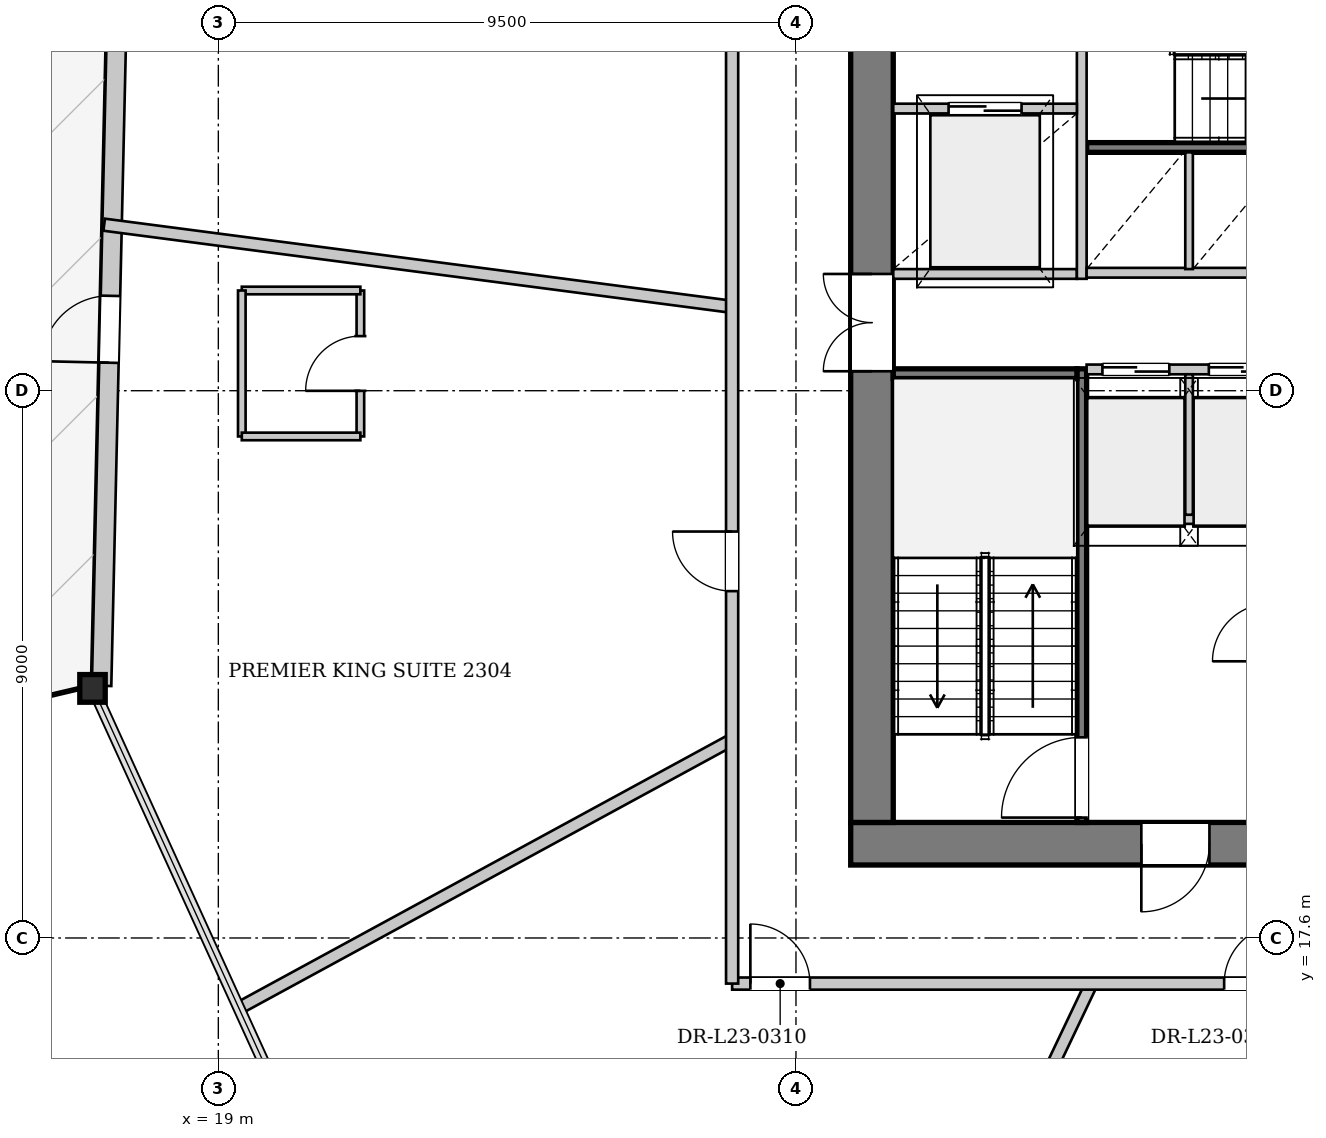
"""IFC4 building model, lengths in metres.
Left out: names, types, materials, properties, quantities, classifications, styles, units other than length and angle.
Written with IfcOpenShell. Run it as: python <this file> out.ifc"""

import sys

from ifc_helpers import new_model, si_unit, direction, frame, frame_2d, origin, origin_2d, place, context, subcontext, project, spatial, rectangle, i_section, extrude, source, transform, mapped, element, fill, save


model = new_model("IFC4")
c1 = context("Model", 3, precision=1e-05, world=origin(), true_north=direction((0.0, 1.0)))
c2 = subcontext(c1, "Body", "Model", "MODEL_VIEW")
j1 = project(units=[si_unit("LENGTHUNIT", "METRE"), si_unit("PLANEANGLEUNIT", "RADIAN")], contexts=[c1])
p1 = place(None, origin())
s1 = spatial("IfcSite", under=j1, at=p1, CompositionType="ELEMENT")
p2 = place(p1, origin())
s2 = spatial("IfcBuilding", under=s1, at=p2, CompositionType="ELEMENT")
p3 = place(p2, frame((0.0, 0.0, 91.5)))
s3 = spatial("IfcBuildingStorey", under=s2, at=p3, CompositionType="ELEMENT", Elevation=91.5)
m1 = source(origin(), c2, "Body", "SweptSolid", [
    extrude(i_section(OverallWidth=0.418, OverallDepth=0.455, WebThickness=0.038, FlangeThickness=0.059, at=origin_2d()), origin(), (0.0, 0.0, 1.0), 3.386),
])
p4 = place(p3, frame((16.92, 21.75, 0.0), z_axis=(0.00627236322, -0.027108144489, 0.99961282803), x_axis=(0.974260018771, 0.225427185194, 0.0)))
e1 = element("IfcColumn", 1, at=p4, inside=s3, PredefinedType="COLUMN", context=c2, shape_type="MappedRepresentation", body=[
    mapped(m1, transform((0.0, 0.0, 0.0), x_axis=(1.0, 0.0, 0.0), y_axis=(0.0, 1.0, 0.0), z_axis=(0.0, 0.0, 1.0), scale=1.0)),
])
p5 = place(p3, frame((17.08, 21.747, 0.0), z_axis=(0.0, 0.0, 1.0), x_axis=(0.022779504823, 0.999740513413, 0.0)))
e2 = element("IfcWall", 2, at=p5, inside=s3, PredefinedType="SOLIDWALL", context=c2, shape_type="SweptSolid", body=[
    extrude(rectangle(XDim=18.327, YDim=0.32, at=frame_2d((9.164, 0.0))), origin(), (0.0, 0.0, 1.0), 2.692),
])
p6 = place(p5, frame((5.315, 0.0, 0.0)))
e3 = element("IfcOpeningElement", 3, at=p6, cuts=e2, PredefinedType="OPENING", context=c2, shape_type="SweptSolid", body=[
    extrude(rectangle(XDim=1.1, YDim=2.3, at=frame_2d((0.55, 1.15))), frame((0.0, 0.17, 0.0), z_axis=(0.0, -1.0, 0.0), x_axis=(1.0, 0.0, 0.0)), (0.0, 0.0, 1.0), 0.34),
])
p7 = place(p5, frame((12.662, 0.0, 0.372)))
e4 = element("IfcOpeningElement", 4, at=p7, cuts=e2, PredefinedType="OPENING", context=c2, shape_type="SweptSolid", body=[
    extrude(rectangle(XDim=1.8, YDim=2.2, at=frame_2d((0.9, 1.1))), frame((0.0, 0.17, 0.0), z_axis=(0.0, -1.0, 0.0), x_axis=(1.0, 0.0, 0.0)), (0.0, 0.0, 1.0), 0.34),
])
p8 = place(p3, frame((46.6, 19.15, 0.0), z_axis=(0.0, 0.0, 1.0), x_axis=(-1.0, 0.0, 0.0)))
e5 = element("IfcWall", 5, at=p8, inside=s3, PredefinedType="SHEAR", context=c2, shape_type="SweptSolid", body=[
    extrude(rectangle(XDim=17.2, YDim=0.7, at=frame_2d((8.6, 0.0))), origin(), (0.0, 0.0, 1.0), 3.3),
])
p9 = place(p8, frame((4.8, 0.0, 0.0)))
e6 = element("IfcOpeningElement", 6, at=p9, cuts=e5, PredefinedType="OPENING", context=c2, shape_type="SweptSolid", body=[
    extrude(rectangle(XDim=1.12, YDim=2.25, at=frame_2d((0.56, 1.125))), frame((0.0, 0.36, 0.0), z_axis=(0.0, -1.0, 0.0), x_axis=(1.0, 0.0, 0.0)), (0.0, 0.0, 1.0), 0.72),
])
p10 = place(p8, frame((11.3, 0.0, 0.0)))
e7 = element("IfcOpeningElement", 7, at=p10, cuts=e5, PredefinedType="OPENING", context=c2, shape_type="SweptSolid", body=[
    extrude(rectangle(XDim=1.12, YDim=2.25, at=frame_2d((0.56, 1.125))), frame((0.0, 0.36, 0.0), z_axis=(0.0, -1.0, 0.0), x_axis=(1.0, 0.0, 0.0)), (0.0, 0.0, 1.0), 0.72),
])
p11 = place(p3, frame((29.75, 19.5, 0.0), z_axis=(0.0, 0.0, 1.0), x_axis=(0.0, 1.0, 0.0)))
e8 = element("IfcWall", 8, at=p11, inside=s3, PredefinedType="SHEAR", context=c2, shape_type="SweptSolid", body=[
    extrude(rectangle(XDim=14.2, YDim=0.7, at=frame_2d((7.1, 0.0))), origin(), (0.0, 0.0, 1.0), 3.3),
])
p12 = place(p11, frame((7.42, 0.0, 0.0)))
e9 = element("IfcOpeningElement", 9, at=p12, cuts=e8, PredefinedType="OPENING", context=c2, shape_type="SweptSolid", body=[
    extrude(rectangle(XDim=1.6, YDim=2.2, at=frame_2d((0.8, 1.1))), frame((0.0, 0.36, 0.0), z_axis=(0.0, -1.0, 0.0), x_axis=(1.0, 0.0, 0.0)), (0.0, 0.0, 1.0), 0.72),
])
p13 = place(p3, frame((33.2, 19.5, 0.0), z_axis=(0.0, 0.0, 1.0), x_axis=(0.0, 1.0, 0.0)))
e10 = element("IfcWall", 10, at=p13, inside=s3, PredefinedType="PARTITIONING", context=c2, shape_type="SweptSolid", body=[
    extrude(rectangle(XDim=7.46, YDim=0.16, at=frame_2d((3.73, 0.0))), origin(), (0.0, 0.0, 1.0), 3.3),
])
p14 = place(p13, frame((0.08, 0.0, 0.0)))
e11 = element("IfcOpeningElement", 11, at=p14, cuts=e10, PredefinedType="OPENING", context=c2, shape_type="SweptSolid", body=[
    extrude(rectangle(XDim=1.32, YDim=2.2, at=frame_2d((0.66, 1.1))), frame((0.0, 0.09, 0.0), z_axis=(0.0, -1.0, 0.0), x_axis=(1.0, 0.0, 0.0)), (0.0, 0.0, 1.0), 0.18),
])
p15 = place(p3, frame((30.1, 26.88, 0.0), z_axis=(0.0, 0.0, 1.0), x_axis=(1.0, 0.0, 0.0)))
e12 = element("IfcWall", 12, at=p15, inside=s3, PredefinedType="PARTITIONING", context=c2, shape_type="SweptSolid", body=[
    extrude(rectangle(XDim=3.02, YDim=0.16, at=frame_2d((1.51, 0.0))), origin(), (0.0, 0.0, 1.0), 3.3),
])
p16 = place(p3, frame((33.28, 30.6, 0.0), z_axis=(0.0, 0.0, 1.0), x_axis=(1.0, 0.0, 0.0)))
e13 = element("IfcWall", 13, at=p16, inside=s3, PredefinedType="PARTITIONING", context=c2, shape_type="SweptSolid", body=[
    extrude(rectangle(XDim=7.3, YDim=0.16, at=frame_2d((3.65, 0.0))), origin(), (0.0, 0.0, 1.0), 3.3),
])
p17 = place(p3, frame((33.28, 24.49, 0.0), z_axis=(0.0, 0.0, 1.0), x_axis=(1.0, 0.0, 0.0)))
e14 = element("IfcWall", 14, at=p17, inside=s3, PredefinedType="PARTITIONING", context=c2, shape_type="SweptSolid", body=[
    extrude(rectangle(XDim=9.44, YDim=0.16, at=frame_2d((4.72, 0.0))), origin(), (0.0, 0.0, 1.0), 3.3),
])
p18 = place(p3, frame((30.1, 28.52, 0.0), z_axis=(0.0, 0.0, 1.0), x_axis=(1.0, 0.0, 0.0)))
e15 = element("IfcWall", 15, at=p18, inside=s3, PredefinedType="PARTITIONING", context=c2, shape_type="SweptSolid", body=[
    extrude(rectangle(XDim=3.02, YDim=0.16, at=frame_2d((1.51, 0.0))), origin(), (0.0, 0.0, 1.0), 3.3),
])
p19 = place(p3, frame((33.2, 28.44, 0.0), z_axis=(0.0, 0.0, 1.0), x_axis=(0.0, 1.0, 0.0)))
e16 = element("IfcWall", 16, at=p19, inside=s3, PredefinedType="PARTITIONING", context=c2, shape_type="SweptSolid", body=[
    extrude(rectangle(XDim=5.26, YDim=0.16, at=frame_2d((2.63, 0.0))), origin(), (0.0, 0.0, 1.0), 3.3),
])
p20 = place(p3, frame((30.1, 31.24, 0.0), z_axis=(0.0, 0.0, 1.0), x_axis=(1.0, 0.0, 0.0)))
e17 = element("IfcWall", 17, at=p20, inside=s3, PredefinedType="PARTITIONING", context=c2, shape_type="SweptSolid", body=[
    extrude(rectangle(XDim=3.02, YDim=0.16, at=frame_2d((1.51, 0.0))), origin(), (0.0, 0.0, 1.0), 3.3),
])
p21 = place(p20, frame((0.91, 0.0, 0.0)))
e18 = element("IfcOpeningElement", 18, at=p21, cuts=e17, PredefinedType="OPENING", context=c2, shape_type="SweptSolid", body=[
    extrude(rectangle(XDim=1.2, YDim=2.2, at=frame_2d((0.6, 1.1))), frame((0.0, 0.09, 0.0), z_axis=(0.0, -1.0, 0.0), x_axis=(1.0, 0.0, 0.0)), (0.0, 0.0, 1.0), 0.18),
])
p22 = place(p3, frame((33.28, 26.95, 0.0), z_axis=(0.0, 0.0, 1.0), x_axis=(1.0, 0.0, 0.0)))
e19 = element("IfcWall", 19, at=p22, inside=s3, PredefinedType="PARTITIONING", context=c2, shape_type="SweptSolid", body=[
    extrude(rectangle(XDim=9.44, YDim=0.16, at=frame_2d((4.72, 0.0))), origin(), (0.0, 0.0, 1.0), 3.3),
])
p23 = place(p22, frame((0.26, 0.0, 0.0)))
e20 = element("IfcOpeningElement", 20, at=p23, cuts=e19, PredefinedType="OPENING", context=c2, shape_type="SweptSolid", body=[
    extrude(rectangle(XDim=1.1, YDim=2.2, at=frame_2d((0.55, 1.1))), frame((0.0, 0.09, 0.0), z_axis=(0.0, -1.0, 0.0), x_axis=(1.0, 0.0, 0.0)), (0.0, 0.0, 1.0), 0.18),
])
p24 = place(p22, frame((2.01, 0.0, 0.0)))
e21 = element("IfcOpeningElement", 21, at=p24, cuts=e19, PredefinedType="OPENING", context=c2, shape_type="SweptSolid", body=[
    extrude(rectangle(XDim=1.1, YDim=2.2, at=frame_2d((0.55, 1.1))), frame((0.0, 0.09, 0.0), z_axis=(0.0, -1.0, 0.0), x_axis=(1.0, 0.0, 0.0)), (0.0, 0.0, 1.0), 0.18),
])
p25 = place(p22, frame((3.76, 0.0, 0.0)))
e22 = element("IfcOpeningElement", 22, at=p25, cuts=e19, PredefinedType="OPENING", context=c2, shape_type="SweptSolid", body=[
    extrude(rectangle(XDim=1.1, YDim=2.2, at=frame_2d((0.55, 1.1))), frame((0.0, 0.09, 0.0), z_axis=(0.0, -1.0, 0.0), x_axis=(1.0, 0.0, 0.0)), (0.0, 0.0, 1.0), 0.18),
])
p26 = place(p22, frame((5.51, 0.0, 0.0)))
e23 = element("IfcOpeningElement", 23, at=p26, cuts=e19, PredefinedType="OPENING", context=c2, shape_type="SweptSolid", body=[
    extrude(rectangle(XDim=1.1, YDim=2.2, at=frame_2d((0.55, 1.1))), frame((0.0, 0.09, 0.0), z_axis=(0.0, -1.0, 0.0), x_axis=(1.0, 0.0, 0.0)), (0.0, 0.0, 1.0), 0.18),
])
p27 = place(p3, frame((34.965, 24.56, 0.0), z_axis=(0.0, 0.0, 1.0), x_axis=(0.0, 1.0, 0.0)))
e24 = element("IfcWall", 24, at=p27, inside=s3, PredefinedType="PARTITIONING", context=c2, shape_type="SweptSolid", body=[
    extrude(rectangle(XDim=2.31, YDim=0.125, at=frame_2d((1.155, 0.0))), origin(), (0.0, 0.0, 1.0), 3.3),
])
p28 = place(p3, frame((33.28, 28.54, 0.0), z_axis=(0.0, 0.0, 1.0), x_axis=(1.0, 0.0, 0.0)))
e25 = element("IfcWall", 25, at=p28, inside=s3, PredefinedType="PARTITIONING", context=c2, shape_type="SweptSolid", body=[
    extrude(rectangle(XDim=12.62, YDim=0.16, at=frame_2d((6.31, 0.0))), origin(), (0.0, 0.0, 1.0), 3.3),
])
p29 = place(p3, frame((34.965, 28.6, 0.0), z_axis=(0.0, 0.0, 1.0), x_axis=(0.0, 1.0, 0.0)))
e26 = element("IfcWall", 26, at=p29, inside=s3, PredefinedType="PARTITIONING", context=c2, shape_type="SweptSolid", body=[
    extrude(rectangle(XDim=1.92, YDim=0.125, at=frame_2d((0.96, 0.0))), origin(), (0.0, 0.0, 1.0), 3.3),
])
p30 = place(p3, frame((27.45, 27.979, 0.0), z_axis=(0.0, 0.0, 1.0), x_axis=(-0.991556828893, 0.129672877176, 0.0)))
e27 = element("IfcWall", 27, at=p30, inside=s3, PredefinedType="PARTITIONING", context=c2, shape_type="SweptSolid", body=[
    extrude(rectangle(XDim=10.415, YDim=0.2, at=frame_2d((5.208, 0.0))), origin(), (0.0, 0.0, 1.0), 3.3),
])
p31 = place(p3, frame((27.45, 20.86, 0.0), z_axis=(0.0, 0.0, 1.0), x_axis=(-0.878400885475, -0.477924559315, 0.0)))
e28 = element("IfcWall", 28, at=p31, inside=s3, PredefinedType="PARTITIONING", context=c2, shape_type="SweptSolid", body=[
    extrude(rectangle(XDim=9.205, YDim=0.2, at=frame_2d((4.603, 0.0))), origin(), (0.0, 0.0, 1.0), 3.3),
])
p32 = place(p3, frame((33.36, 16.85, 0.0), z_axis=(0.0, 0.0, 1.0), x_axis=(-0.429721491406, -0.902961483024, 0.0)))
e29 = element("IfcWall", 29, at=p32, inside=s3, PredefinedType="PARTITIONING", context=c2, shape_type="SweptSolid", body=[
    extrude(rectangle(XDim=14.165, YDim=0.2, at=frame_2d((7.083, 0.0))), origin(), (0.0, 0.0, 1.0), 3.3),
])
p33 = place(p3, frame((21.336, 25.848, 0.0), z_axis=(0.0, 0.0, 1.0), x_axis=(0.0, 1.0, 0.0)))
e30 = element("IfcWall", 30, at=p33, inside=s3, PredefinedType="PARTITIONING", context=c2, shape_type="SweptSolid", body=[
    extrude(rectangle(XDim=2.4, YDim=0.125, at=frame_2d((1.2, 0.0))), origin(), (0.0, 0.0, 1.0), 3.3),
])
p34 = place(p33, frame((0.75, 0.0, 0.0)))
e31 = element("IfcOpeningElement", 31, at=p34, cuts=e30, PredefinedType="OPENING", context=c2, shape_type="SweptSolid", body=[
    extrude(rectangle(XDim=0.9, YDim=2.1, at=frame_2d((0.45, 1.05))), frame((0.0, 0.073, 0.0), z_axis=(0.0, -1.0, 0.0), x_axis=(1.0, 0.0, 0.0)), (0.0, 0.0, 1.0), 0.145),
])
p35 = place(p3, frame((21.336, 28.248, 0.0), z_axis=(0.0, 0.0, 1.0), x_axis=(-1.0, 0.0, 0.0)))
e32 = element("IfcWall", 32, at=p35, inside=s3, PredefinedType="PARTITIONING", context=c2, shape_type="SweptSolid", body=[
    extrude(rectangle(XDim=1.95, YDim=0.125, at=frame_2d((0.975, 0.0))), origin(), (0.0, 0.0, 1.0), 3.3),
])
p36 = place(p3, frame((19.386, 28.248, 0.0), z_axis=(0.0, 0.0, 1.0), x_axis=(0.0, -1.0, 0.0)))
e33 = element("IfcWall", 33, at=p36, inside=s3, PredefinedType="PARTITIONING", context=c2, shape_type="SweptSolid", body=[
    extrude(rectangle(XDim=2.4, YDim=0.125, at=frame_2d((1.2, 0.0))), origin(), (0.0, 0.0, 1.0), 3.3),
])
p37 = place(p3, frame((19.386, 25.848, 0.0), z_axis=(0.0, 0.0, 1.0), x_axis=(1.0, 0.0, 0.0)))
e34 = element("IfcWall", 34, at=p37, inside=s3, PredefinedType="PARTITIONING", context=c2, shape_type="SweptSolid", body=[
    extrude(rectangle(XDim=1.95, YDim=0.125, at=frame_2d((0.975, 0.0))), origin(), (0.0, 0.0, 1.0), 3.3),
])
p38 = place(p3, frame((27.45, 16.85, 0.0), z_axis=(0.0, 0.0, 1.0), x_axis=(1.0, 0.0, 0.0)))
e35 = element("IfcWall", 35, at=p38, inside=s3, PredefinedType="PARTITIONING", context=c2, shape_type="SweptSolid", body=[
    extrude(rectangle(XDim=21.1, YDim=0.2, at=frame_2d((10.55, 0.0))), origin(), (0.0, 0.0, 1.0), 3.3),
])
p39 = place(p38, frame((0.3, 0.0, 0.0)))
e36 = element("IfcOpeningElement", 36, at=p39, cuts=e35, PredefinedType="OPENING", context=c2, shape_type="SweptSolid", body=[
    extrude(rectangle(XDim=0.98, YDim=2.15, at=frame_2d((0.49, 1.075))), frame((0.0, 0.11, 0.0), z_axis=(0.0, -1.0, 0.0), x_axis=(1.0, 0.0, 0.0)), (0.0, 0.0, 1.0), 0.22),
])
p40 = place(p38, frame((8.092, 0.0, 0.0)))
e37 = element("IfcOpeningElement", 37, at=p40, cuts=e35, PredefinedType="OPENING", context=c2, shape_type="SweptSolid", body=[
    extrude(rectangle(XDim=0.98, YDim=2.15, at=frame_2d((0.49, 1.075))), frame((0.0, 0.11, 0.0), z_axis=(0.0, -1.0, 0.0), x_axis=(1.0, 0.0, 0.0)), (0.0, 0.0, 1.0), 0.22),
])
p41 = place(p38, frame((18.251, 0.0, 0.0)))
e38 = element("IfcOpeningElement", 38, at=p41, cuts=e35, PredefinedType="OPENING", context=c2, shape_type="SweptSolid", body=[
    extrude(rectangle(XDim=0.98, YDim=2.15, at=frame_2d((0.49, 1.075))), frame((0.0, 0.11, 0.0), z_axis=(0.0, -1.0, 0.0), x_axis=(1.0, 0.0, 0.0)), (0.0, 0.0, 1.0), 0.22),
])
p42 = place(p3, frame((27.45, 16.85, 0.0), z_axis=(0.0, 0.0, 1.0), x_axis=(0.0, 1.0, 0.0)))
e39 = element("IfcWall", 39, at=p42, inside=s3, PredefinedType="PARTITIONING", context=c2, shape_type="SweptSolid", body=[
    extrude(rectangle(XDim=19.5, YDim=0.2, at=frame_2d((9.75, 0.0))), origin(), (0.0, 0.0, 1.0), 3.3),
])
p43 = place(p42, frame((15.48, 0.0, 0.0)))
e40 = element("IfcOpeningElement", 40, at=p43, cuts=e39, PredefinedType="OPENING", context=c2, shape_type="SweptSolid", body=[
    extrude(rectangle(XDim=0.98, YDim=2.15, at=frame_2d((0.49, 1.075))), frame((0.0, 0.11, 0.0), z_axis=(0.0, -1.0, 0.0), x_axis=(1.0, 0.0, 0.0)), (0.0, 0.0, 1.0), 0.22),
])
p44 = place(p42, frame((6.454, 0.0, 0.0)))
e41 = element("IfcOpeningElement", 41, at=p44, cuts=e39, PredefinedType="OPENING", context=c2, shape_type="SweptSolid", body=[
    extrude(rectangle(XDim=0.98, YDim=2.15, at=frame_2d((0.49, 1.075))), frame((0.0, 0.11, 0.0), z_axis=(0.0, -1.0, 0.0), x_axis=(1.0, 0.0, 0.0)), (0.0, 0.0, 1.0), 0.22),
])
m2 = source(origin(), c2, "Body", "SweptSolid", [
    extrude(rectangle(XDim=1.1, YDim=2.3, at=frame_2d((0.55, 1.15))), frame((0.0, 0.025, 0.0), z_axis=(0.0, -1.0, 0.0), x_axis=(1.0, 0.0, 0.0)), (0.0, 0.0, 1.0), 0.05),
])
p45 = place(p6, origin())
e42 = element("IfcDoor", 42, at=p45, inside=s3, OperationType="SINGLE_SWING_LEFT", PredefinedType="DOOR", context=c2, shape_type="MappedRepresentation", body=[
    mapped(m2, transform((0.0, 0.0, 0.0), x_axis=(1.0, 0.0, 0.0), y_axis=(0.0, 1.0, 0.0), z_axis=(0.0, 0.0, 1.0), scale=1.0)),
])
fill(e3, e42)
m3 = source(origin(), c2, "Body", "SweptSolid", [
    extrude(rectangle(XDim=1.12, YDim=2.25, at=frame_2d((0.56, 1.125))), frame((0.0, 0.025, 0.0), z_axis=(0.0, -1.0, 0.0), x_axis=(1.0, 0.0, 0.0)), (0.0, 0.0, 1.0), 0.05),
])
p46 = place(p10, origin())
e43 = element("IfcDoor", 43, at=p46, inside=s3, OperationType="SINGLE_SWING_RIGHT", PredefinedType="DOOR", context=c2, shape_type="MappedRepresentation", body=[
    mapped(m3, transform((0.0, 0.0, 0.0), x_axis=(1.0, 0.0, 0.0), y_axis=(0.0, 1.0, 0.0), z_axis=(0.0, 0.0, 1.0), scale=1.0)),
])
fill(e7, e43)
m4 = source(origin(), c2, "Body", "SweptSolid", [
    extrude(rectangle(XDim=1.6, YDim=2.2, at=frame_2d((0.8, 1.1))), frame((0.0, 0.025, 0.0), z_axis=(0.0, -1.0, 0.0), x_axis=(1.0, 0.0, 0.0)), (0.0, 0.0, 1.0), 0.05),
])
p47 = place(p12, origin())
e44 = element("IfcDoor", 44, at=p47, inside=s3, OperationType="DOUBLE_DOOR_SINGLE_SWING", PredefinedType="DOOR", context=c2, shape_type="MappedRepresentation", body=[
    mapped(m4, transform((0.0, 0.0, 0.0), x_axis=(1.0, 0.0, 0.0), y_axis=(0.0, 1.0, 0.0), z_axis=(0.0, 0.0, 1.0), scale=1.0)),
])
fill(e9, e44)
m5 = source(origin(), c2, "Body", "SweptSolid", [
    extrude(rectangle(XDim=1.32, YDim=2.2, at=frame_2d((0.66, 1.1))), frame((0.0, 0.025, 0.0), z_axis=(0.0, -1.0, 0.0), x_axis=(1.0, 0.0, 0.0)), (0.0, 0.0, 1.0), 0.05),
])
p48 = place(p14, origin())
e45 = element("IfcDoor", 45, at=p48, inside=s3, OperationType="SINGLE_SWING_LEFT", PredefinedType="DOOR", context=c2, shape_type="MappedRepresentation", body=[
    mapped(m5, transform((0.0, 0.0, 0.0), x_axis=(1.0, 0.0, 0.0), y_axis=(0.0, 1.0, 0.0), z_axis=(0.0, 0.0, 1.0), scale=1.0)),
])
fill(e11, e45)
m6 = source(origin(), c2, "Body", "SweptSolid", [
    extrude(rectangle(XDim=1.2, YDim=2.2, at=frame_2d((0.6, 1.1))), frame((0.0, 0.025, 0.0), z_axis=(0.0, -1.0, 0.0), x_axis=(1.0, 0.0, 0.0)), (0.0, 0.0, 1.0), 0.05),
])
p49 = place(p21, origin())
e46 = element("IfcDoor", 46, at=p49, inside=s3, OperationType="DOUBLE_DOOR_SLIDING", PredefinedType="DOOR", context=c2, shape_type="MappedRepresentation", body=[
    mapped(m6, transform((0.0, 0.0, 0.0), x_axis=(1.0, 0.0, 0.0), y_axis=(0.0, 1.0, 0.0), z_axis=(0.0, 0.0, 1.0), scale=1.0)),
])
fill(e18, e46)
m7 = source(origin(), c2, "Body", "SweptSolid", [
    extrude(rectangle(XDim=1.1, YDim=2.2, at=frame_2d((0.55, 1.1))), frame((0.0, 0.025, 0.0), z_axis=(0.0, -1.0, 0.0), x_axis=(1.0, 0.0, 0.0)), (0.0, 0.0, 1.0), 0.05),
])
p50 = place(p23, origin())
e47 = element("IfcDoor", 47, at=p50, inside=s3, OperationType="DOUBLE_DOOR_SLIDING", PredefinedType="DOOR", context=c2, shape_type="MappedRepresentation", body=[
    mapped(m7, transform((0.0, 0.0, 0.0), x_axis=(1.0, 0.0, 0.0), y_axis=(0.0, 1.0, 0.0), z_axis=(0.0, 0.0, 1.0), scale=1.0)),
])
fill(e20, e47)
p51 = place(p24, origin())
e48 = element("IfcDoor", 48, at=p51, inside=s3, OperationType="DOUBLE_DOOR_SLIDING", PredefinedType="DOOR", context=c2, shape_type="MappedRepresentation", body=[
    mapped(m7, transform((0.0, 0.0, 0.0), x_axis=(1.0, 0.0, 0.0), y_axis=(0.0, 1.0, 0.0), z_axis=(0.0, 0.0, 1.0), scale=1.0)),
])
fill(e21, e48)
m8 = source(origin(), c2, "Body", "SweptSolid", [
    extrude(rectangle(XDim=0.9, YDim=2.1, at=frame_2d((0.45, 1.05))), frame((0.0, 0.025, 0.0), z_axis=(0.0, -1.0, 0.0), x_axis=(1.0, 0.0, 0.0)), (0.0, 0.0, 1.0), 0.05),
])
p52 = place(p34, origin())
e49 = element("IfcDoor", 49, at=p52, inside=s3, OperationType="SINGLE_SWING_LEFT", PredefinedType="DOOR", context=c2, shape_type="MappedRepresentation", body=[
    mapped(m8, transform((0.0, 0.0, 0.0), x_axis=(1.0, 0.0, 0.0), y_axis=(0.0, 1.0, 0.0), z_axis=(0.0, 0.0, 1.0), scale=1.0)),
])
fill(e31, e49)
m9 = source(origin(), c2, "Body", "SweptSolid", [
    extrude(rectangle(XDim=0.98, YDim=2.15, at=frame_2d((0.49, 1.075))), frame((0.0, 0.025, 0.0), z_axis=(0.0, -1.0, 0.0), x_axis=(1.0, 0.0, 0.0)), (0.0, 0.0, 1.0), 0.05),
])
p53 = place(p39, origin())
e50 = element("IfcDoor", 50, at=p53, inside=s3, OperationType="SINGLE_SWING_LEFT", PredefinedType="DOOR", context=c2, shape_type="MappedRepresentation", body=[
    mapped(m9, transform((0.0, 0.0, 0.0), x_axis=(1.0, 0.0, 0.0), y_axis=(0.0, 1.0, 0.0), z_axis=(0.0, 0.0, 1.0), scale=1.0)),
])
fill(e36, e50)
p54 = place(p40, origin())
e51 = element("IfcDoor", 51, at=p54, inside=s3, OperationType="SINGLE_SWING_RIGHT", PredefinedType="DOOR", context=c2, shape_type="MappedRepresentation", body=[
    mapped(m9, transform((0.0, 0.0, 0.0), x_axis=(1.0, 0.0, 0.0), y_axis=(0.0, 1.0, 0.0), z_axis=(0.0, 0.0, 1.0), scale=1.0)),
])
fill(e37, e51)
p55 = place(p44, origin())
e52 = element("IfcDoor", 52, at=p55, inside=s3, OperationType="SINGLE_SWING_RIGHT", PredefinedType="DOOR", context=c2, shape_type="MappedRepresentation", body=[
    mapped(m9, transform((0.0, 0.0, 0.0), x_axis=(1.0, 0.0, 0.0), y_axis=(0.0, 1.0, 0.0), z_axis=(0.0, 0.0, 1.0), scale=1.0)),
])
fill(e41, e52)
save(model, sys.argv[1])
